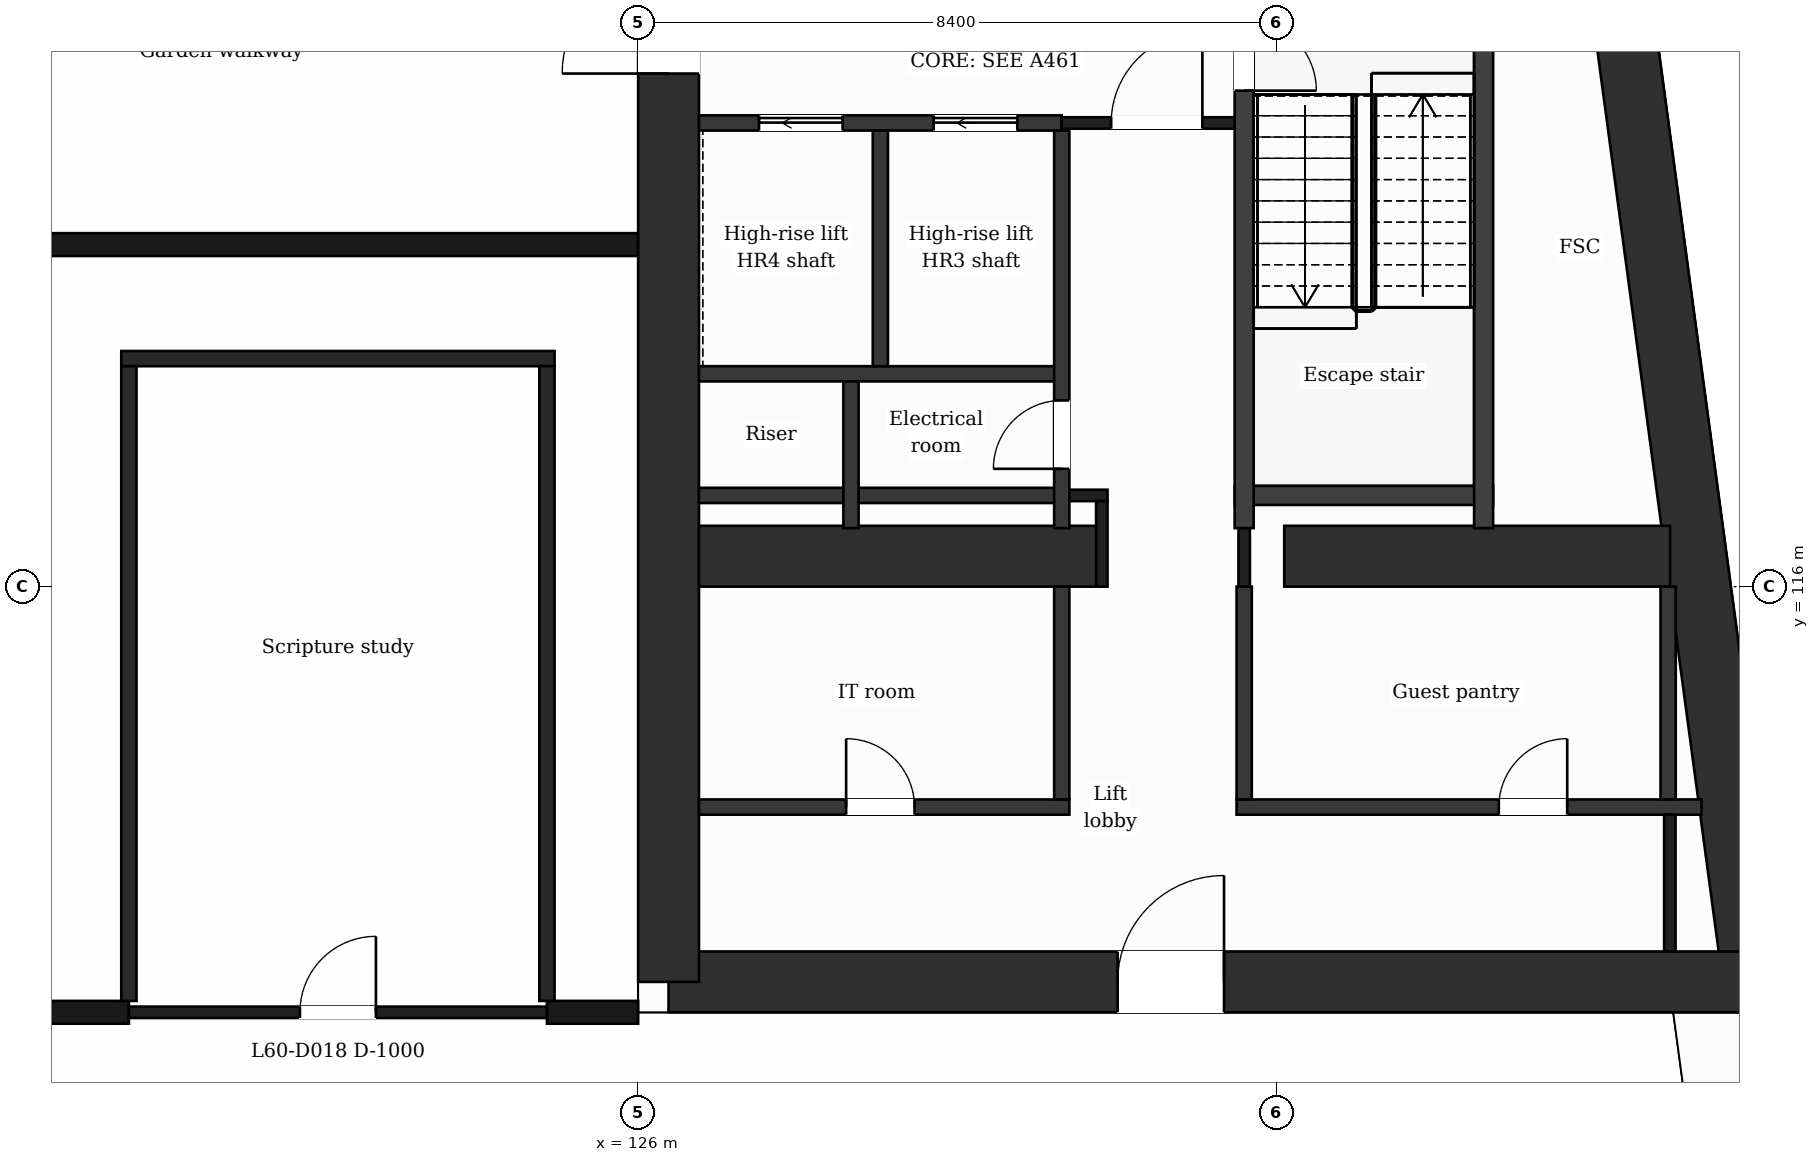
"""IFC4 building model, lengths in metres.
Left out: names, types, materials, properties, quantities, classifications, styles, units other than length and angle.
Written with IfcOpenShell. Run it as: python <this file> out.ifc"""

import sys

from ifc_helpers import new_model, si_unit, direction, frame, frame_2d, origin, place, context, subcontext, project, spatial, rectangle, extrude, element, fill, save


model = new_model("IFC4")
c1 = context("Model", 3, precision=1e-05, world=origin(), true_north=direction((0.0, 1.0)))
c2 = subcontext(c1, "Body", "Model", "MODEL_VIEW")
j1 = project(units=[si_unit("LENGTHUNIT", "METRE"), si_unit("PLANEANGLEUNIT", "RADIAN")], contexts=[c1])
p1 = place(None, origin())
s1 = spatial("IfcSite", under=j1, at=p1, CompositionType="ELEMENT")
p2 = place(p1, origin())
s2 = spatial("IfcBuilding", under=s1, at=p2, CompositionType="ELEMENT")
p3 = place(p2, frame((0.0, 0.0, 246.6)))
s3 = spatial("IfcBuildingStorey", under=s2, at=p3, CompositionType="ELEMENT", Elevation=246.6)
p4 = place(p3, frame((137.82, 132.0, 0.0), z_axis=(0.0, 0.0, 1.0), x_axis=(0.133408347329, -0.991061154956, 0.0)))
e1 = element("IfcWall", 1, at=p4, inside=s3, PredefinedType="SHEAR", context=c2, shape_type="SweptSolid", body=[
    extrude(rectangle(XDim=21.391, YDim=0.8, at=frame_2d((10.696, 0.0))), origin(), (0.0, 0.0, 1.0), 7.4),
])
p5 = place(p3, frame((140.673, 110.8, 0.0), z_axis=(0.0, 0.0, 1.0), x_axis=(-1.0, 0.0, 0.0)))
e2 = element("IfcWall", 2, at=p5, inside=s3, PredefinedType="SHEAR", context=c2, shape_type="SweptSolid", body=[
    extrude(rectangle(XDim=14.273, YDim=0.8, at=frame_2d((7.137, 0.0))), origin(), (0.0, 0.0, 1.0), 7.4),
])
p6 = place(p5, frame((6.965, 0.0, 0.0)))
e3 = element("IfcOpeningElement", 3, at=p6, cuts=e2, PredefinedType="OPENING", context=c2, shape_type="SweptSolid", body=[
    extrude(rectangle(XDim=1.4, YDim=2.1, at=frame_2d((0.7, 1.05))), frame((0.0, 0.41, 0.0), z_axis=(0.0, -1.0, 0.0), x_axis=(1.0, 0.0, 0.0)), (0.0, 0.0, 1.0), 0.82),
])
p7 = place(p3, frame((126.4, 110.8, 0.0), z_axis=(0.0, 0.0, 1.0), x_axis=(0.0, 1.0, 0.0)))
e4 = element("IfcWall", 4, at=p7, inside=s3, PredefinedType="SHEAR", context=c2, shape_type="SweptSolid", body=[
    extrude(rectangle(XDim=21.2, YDim=0.8, at=frame_2d((10.6, 0.0))), origin(), (0.0, 0.0, 1.0), 7.4),
])
p8 = place(p7, frame((11.95, 0.0, 0.0)))
e5 = element("IfcOpeningElement", 5, at=p8, cuts=e4, PredefinedType="OPENING", context=c2, shape_type="SweptSolid", body=[
    extrude(rectangle(XDim=1.4, YDim=2.1, at=frame_2d((0.7, 1.05))), frame((0.0, 0.41, 0.0), z_axis=(0.0, -1.0, 0.0), x_axis=(1.0, 0.0, 0.0)), (0.0, 0.0, 1.0), 0.82),
])
p9 = place(p3, frame((126.8, 116.4, 0.0), z_axis=(0.0, 0.0, 1.0), x_axis=(1.0, 0.0, 0.0)))
e6 = element("IfcWall", 6, at=p9, inside=s3, PredefinedType="SHEAR", context=c2, shape_type="SweptSolid", body=[
    extrude(rectangle(XDim=5.3, YDim=0.8, at=frame_2d((2.65, 0.0))), origin(), (0.0, 0.0, 1.0), 7.4),
])
p10 = place(p3, frame((134.5, 116.4, 0.0), z_axis=(0.0, 0.0, 1.0), x_axis=(1.0, 0.0, 0.0)))
e7 = element("IfcWall", 7, at=p10, inside=s3, PredefinedType="SHEAR", context=c2, shape_type="SweptSolid", body=[
    extrude(rectangle(XDim=5.077, YDim=0.8, at=frame_2d((2.539, 0.0))), origin(), (0.0, 0.0, 1.0), 7.4),
])
p11 = place(p3, frame((115.9, 110.4, 0.0), z_axis=(0.0, 0.0, 1.0), x_axis=(1.0, 0.0, 0.0)))
e8 = element("IfcWall", 8, at=p11, inside=s3, PredefinedType="PARTITIONING", context=c2, shape_type="SweptSolid", body=[
    extrude(rectangle(XDim=3.4, YDim=0.3, at=frame_2d((1.7, 0.0))), origin(), (0.0, 0.0, 1.0), 1.0),
])
p12 = place(p3, frame((124.8, 110.4, 0.0), z_axis=(0.0, 0.0, 1.0), x_axis=(1.0, 0.0, 0.0)))
e9 = element("IfcWall", 9, at=p12, inside=s3, PredefinedType="PARTITIONING", context=c2, shape_type="SweptSolid", body=[
    extrude(rectangle(XDim=1.2, YDim=0.3, at=frame_2d((0.6, 0.0))), origin(), (0.0, 0.0, 1.0), 1.0),
])
p13 = place(p3, frame((119.3, 110.4, 0.0), z_axis=(0.0, 0.0, 1.0), x_axis=(1.0, 0.0, 0.0)))
e10 = element("IfcWall", 10, at=p13, inside=s3, PredefinedType="PARTITIONING", context=c2, shape_type="SweptSolid", body=[
    extrude(rectangle(XDim=5.5, YDim=0.15, at=frame_2d((2.75, 0.0))), origin(), (0.0, 0.0, 1.0), 6.9),
])
p14 = place(p13, frame((2.25, 0.0, 0.0)))
e11 = element("IfcOpeningElement", 11, at=p14, cuts=e10, PredefinedType="OPENING", context=c2, shape_type="SweptSolid", body=[
    extrude(rectangle(XDim=1.0, YDim=2.1, at=frame_2d((0.5, 1.05))), frame((0.0, 0.085, 0.0), z_axis=(0.0, -1.0, 0.0), x_axis=(1.0, 0.0, 0.0)), (0.0, 0.0, 1.0), 0.17),
])
p15 = place(p3, frame((126.8, 113.1, 0.0), z_axis=(0.0, 0.0, 1.0), x_axis=(1.0, 0.0, 0.0)))
e12 = element("IfcWall", 12, at=p15, inside=s3, PredefinedType="PARTITIONING", context=c2, shape_type="SweptSolid", body=[
    extrude(rectangle(XDim=4.873, YDim=0.2, at=frame_2d((2.437, 0.0))), origin(), (0.0, 0.0, 1.0), 6.9),
])
p16 = place(p15, frame((1.936, 0.0, 0.0)))
e13 = element("IfcOpeningElement", 13, at=p16, cuts=e12, PredefinedType="OPENING", context=c2, shape_type="SweptSolid", body=[
    extrude(rectangle(XDim=0.9, YDim=2.1, at=frame_2d((0.45, 1.05))), frame((0.0, 0.11, 0.0), z_axis=(0.0, -1.0, 0.0), x_axis=(1.0, 0.0, 0.0)), (0.0, 0.0, 1.0), 0.22),
])
p17 = place(p3, frame((133.873, 113.1, 0.0), z_axis=(0.0, 0.0, 1.0), x_axis=(1.0, 0.0, 0.0)))
e14 = element("IfcWall", 14, at=p17, inside=s3, PredefinedType="PARTITIONING", context=c2, shape_type="SweptSolid", body=[
    extrude(rectangle(XDim=6.117, YDim=0.2, at=frame_2d((3.059, 0.0))), origin(), (0.0, 0.0, 1.0), 6.9),
])
p18 = place(p17, frame((3.45, 0.0, 0.0)))
e15 = element("IfcOpeningElement", 15, at=p18, cuts=e14, PredefinedType="OPENING", context=c2, shape_type="SweptSolid", body=[
    extrude(rectangle(XDim=0.9, YDim=2.1, at=frame_2d((0.45, 1.05))), frame((0.0, 0.11, 0.0), z_axis=(0.0, -1.0, 0.0), x_axis=(1.0, 0.0, 0.0)), (0.0, 0.0, 1.0), 0.22),
])
p19 = place(p3, frame((126.8, 117.2, 0.0), z_axis=(0.0, 0.0, 1.0), x_axis=(1.0, 0.0, 0.0)))
e16 = element("IfcWall", 16, at=p19, inside=s3, PredefinedType="PARTITIONING", context=c2, shape_type="SweptSolid", body=[
    extrude(rectangle(XDim=4.773, YDim=0.2, at=frame_2d((2.386, 0.0))), origin(), (0.0, 0.0, 1.0), 6.9),
])
p20 = place(p3, frame((131.573, 117.2, 0.0), z_axis=(0.0, 0.0, 1.0), x_axis=(1.0, 0.0, 0.0)))
e17 = element("IfcWall", 17, at=p20, inside=s3, PredefinedType="PARTITIONING", context=c2, shape_type="SweptSolid", body=[
    extrude(rectangle(XDim=0.602, YDim=0.15, at=frame_2d((0.301, 0.0))), origin(), (0.0, 0.0, 1.0), 6.9),
])
p21 = place(p3, frame((133.848, 117.2, 0.0), z_axis=(0.0, 0.0, 1.0), x_axis=(1.0, 0.0, 0.0)))
e18 = element("IfcWall", 18, at=p21, inside=s3, PredefinedType="PARTITIONING", context=c2, shape_type="SweptSolid", body=[
    extrude(rectangle(XDim=3.4, YDim=0.25, at=frame_2d((1.7, 0.0))), origin(), (0.0, 0.0, 1.0), 6.9),
])
p22 = place(p3, frame((126.8, 118.8, 0.0), z_axis=(0.0, 0.0, 1.0), x_axis=(1.0, 0.0, 0.0)))
e19 = element("IfcWall", 19, at=p22, inside=s3, PredefinedType="PARTITIONING", context=c2, shape_type="SweptSolid", body=[
    extrude(rectangle(XDim=4.773, YDim=0.2, at=frame_2d((2.386, 0.0))), origin(), (0.0, 0.0, 1.0), 6.9),
])
p23 = place(p3, frame((119.2, 119.0, 0.0), z_axis=(0.0, 0.0, 1.0), x_axis=(1.0, 0.0, 0.0)))
e20 = element("IfcWall", 20, at=p23, inside=s3, PredefinedType="PARTITIONING", context=c2, shape_type="SweptSolid", body=[
    extrude(rectangle(XDim=5.7, YDim=0.2, at=frame_2d((2.85, 0.0))), origin(), (0.0, 0.0, 1.0), 6.9),
])
p24 = place(p3, frame((100.8, 120.5, 0.0), z_axis=(0.0, 0.0, 1.0), x_axis=(1.0, 0.0, 0.0)))
e21 = element("IfcWall", 21, at=p24, inside=s3, PredefinedType="PARTITIONING", context=c2, shape_type="SweptSolid", body=[
    extrude(rectangle(XDim=25.2, YDim=0.3, at=frame_2d((12.6, 0.0))), origin(), (0.0, 0.0, 1.0), 1.0),
])
p25 = place(p3, frame((126.8, 122.1, 0.0), z_axis=(0.0, 0.0, 1.0), x_axis=(1.0, 0.0, 0.0)))
e22 = element("IfcWall", 22, at=p25, inside=s3, PredefinedType="PARTITIONING", context=c2, shape_type="SweptSolid", body=[
    extrude(rectangle(XDim=4.773, YDim=0.2, at=frame_2d((2.386, 0.0))), origin(), (0.0, 0.0, 1.0), 6.9),
])
p26 = place(p25, frame((3.088, 0.0, 0.0)))
e23 = element("IfcOpeningElement", 23, at=p26, cuts=e22, PredefinedType="OPENING", context=c2, shape_type="SweptSolid", body=[
    extrude(rectangle(XDim=1.1, YDim=2.1, at=frame_2d((0.55, 1.05))), frame((0.0, 0.11, 0.0), z_axis=(0.0, -1.0, 0.0), x_axis=(1.0, 0.0, 0.0)), (0.0, 0.0, 1.0), 0.22),
])
p27 = place(p25, frame((0.79, 0.0, 0.0)))
e24 = element("IfcOpeningElement", 24, at=p27, cuts=e22, PredefinedType="OPENING", context=c2, shape_type="SweptSolid", body=[
    extrude(rectangle(XDim=1.1, YDim=2.1, at=frame_2d((0.55, 1.05))), frame((0.0, 0.11, 0.0), z_axis=(0.0, -1.0, 0.0), x_axis=(1.0, 0.0, 0.0)), (0.0, 0.0, 1.0), 0.22),
])
p28 = place(p3, frame((131.573, 122.1, 0.0), z_axis=(0.0, 0.0, 1.0), x_axis=(1.0, 0.0, 0.0)))
e25 = element("IfcWall", 25, at=p28, inside=s3, PredefinedType="PARTITIONING", context=c2, shape_type="SweptSolid", body=[
    extrude(rectangle(XDim=2.4, YDim=0.15, at=frame_2d((1.2, 0.0))), origin(), (0.0, 0.0, 1.0), 6.9),
])
p29 = place(p28, frame((0.65, 0.0, 0.0)))
e26 = element("IfcOpeningElement", 26, at=p29, cuts=e25, PredefinedType="OPENING", context=c2, shape_type="SweptSolid", body=[
    extrude(rectangle(XDim=1.2, YDim=2.1, at=frame_2d((0.6, 1.05))), frame((0.0, 0.085, 0.0), z_axis=(0.0, -1.0, 0.0), x_axis=(1.0, 0.0, 0.0)), (0.0, 0.0, 1.0), 0.17),
])
for number, where, z_axis, x_axis in (
    (27, (119.3, 110.55, 0.0), (0.0, 0.0, 1.0), (0.0, 1.0, 0.0)),
    (28, (124.8, 110.55, 0.0), (0.0, 0.0, 1.0), (0.0, 1.0, 0.0)),
):
    element("IfcWall", number, at=place(p3, frame(where, z_axis=z_axis, x_axis=x_axis)), inside=s3, PredefinedType="PARTITIONING", context=c2, shape_type="SweptSolid", body=[
        extrude(rectangle(XDim=8.35, YDim=0.2, at=frame_2d((4.175, 0.0))), origin(), (0.0, 0.0, 1.0), 6.9),
    ])
p30 = place(p3, frame((128.8, 116.77, 0.0), z_axis=(0.0, 0.0, 1.0), x_axis=(0.0, 1.0, 0.0)))
e29 = element("IfcWall", 29, at=p30, inside=s3, PredefinedType="PARTITIONING", context=c2, shape_type="SweptSolid", body=[
    extrude(rectangle(XDim=1.93, YDim=0.2, at=frame_2d((0.965, 0.0))), origin(), (0.0, 0.0, 1.0), 6.9),
])
p31 = place(p3, frame((129.187, 118.9, 0.0), z_axis=(0.0, 0.0, 1.0), x_axis=(0.0, 1.0, 0.0)))
e30 = element("IfcWall", 30, at=p31, inside=s3, PredefinedType="PARTITIONING", context=c2, shape_type="SweptSolid", body=[
    extrude(rectangle(XDim=3.1, YDim=0.2, at=frame_2d((1.55, 0.0))), origin(), (0.0, 0.0, 1.0), 6.9),
])
p32 = place(p3, frame((131.573, 113.2, 0.0), z_axis=(0.0, 0.0, 1.0), x_axis=(0.0, 1.0, 0.0)))
e31 = element("IfcWall", 31, at=p32, inside=s3, PredefinedType="PARTITIONING", context=c2, shape_type="SweptSolid", body=[
    extrude(rectangle(XDim=2.8, YDim=0.2, at=frame_2d((1.4, 0.0))), origin(), (0.0, 0.0, 1.0), 6.9),
])
p33 = place(p3, frame((131.573, 116.77, 0.0), z_axis=(0.0, 0.0, 1.0), x_axis=(0.0, 1.0, 0.0)))
e32 = element("IfcWall", 32, at=p33, inside=s3, PredefinedType="PARTITIONING", context=c2, shape_type="SweptSolid", body=[
    extrude(rectangle(XDim=5.23, YDim=0.2, at=frame_2d((2.615, 0.0))), origin(), (0.0, 0.0, 1.0), 6.9),
])
p34 = place(p33, frame((0.78, 0.0, 0.0)))
e33 = element("IfcOpeningElement", 33, at=p34, cuts=e32, PredefinedType="OPENING", context=c2, shape_type="SweptSolid", body=[
    extrude(rectangle(XDim=0.9, YDim=2.1, at=frame_2d((0.45, 1.05))), frame((0.0, 0.11, 0.0), z_axis=(0.0, -1.0, 0.0), x_axis=(1.0, 0.0, 0.0)), (0.0, 0.0, 1.0), 0.22),
])
p35 = place(p3, frame((132.1, 116.0, 0.0), z_axis=(0.0, 0.0, 1.0), x_axis=(0.0, 1.0, 0.0)))
e34 = element("IfcWall", 34, at=p35, inside=s3, PredefinedType="PARTITIONING", context=c2, shape_type="SweptSolid", body=[
    extrude(rectangle(XDim=1.125, YDim=0.15, at=frame_2d((0.562, 0.0))), origin(), (0.0, 0.0, 1.0), 6.9),
])
p36 = place(p3, frame((133.973, 113.2, 0.0), z_axis=(0.0, 0.0, 1.0), x_axis=(0.0, 1.0, 0.0)))
e35 = element("IfcWall", 35, at=p36, inside=s3, PredefinedType="PARTITIONING", context=c2, shape_type="SweptSolid", body=[
    extrude(rectangle(XDim=2.8, YDim=0.2, at=frame_2d((1.4, 0.0))), origin(), (0.0, 0.0, 1.0), 6.9),
])
p37 = place(p3, frame((133.973, 116.0, 0.0), z_axis=(0.0, 0.0, 1.0), x_axis=(0.0, 1.0, 0.0)))
e36 = element("IfcWall", 36, at=p37, inside=s3, PredefinedType="PARTITIONING", context=c2, shape_type="SweptSolid", body=[
    extrude(rectangle(XDim=0.77, YDim=0.15, at=frame_2d((0.385, 0.0))), origin(), (0.0, 0.0, 1.0), 6.9),
])
p38 = place(p3, frame((133.973, 116.77, 0.0), z_axis=(0.0, 0.0, 1.0), x_axis=(0.0, 1.0, 0.0)))
e37 = element("IfcWall", 37, at=p38, inside=s3, PredefinedType="PARTITIONING", context=c2, shape_type="SweptSolid", body=[
    extrude(rectangle(XDim=7.055, YDim=0.25, at=frame_2d((3.527, 0.0))), origin(), (0.0, 0.0, 1.0), 6.9),
])
p39 = place(p38, frame((5.755, 0.0, 0.0)))
e38 = element("IfcOpeningElement", 38, at=p39, cuts=e37, PredefinedType="OPENING", context=c2, shape_type="SweptSolid", body=[
    extrude(rectangle(XDim=0.95, YDim=2.1, at=frame_2d((0.475, 1.05))), frame((0.0, 0.135, 0.0), z_axis=(0.0, -1.0, 0.0), x_axis=(1.0, 0.0, 0.0)), (0.0, 0.0, 1.0), 0.27),
])
p40 = place(p3, frame((137.123, 116.77, 0.0), z_axis=(0.0, 0.0, 1.0), x_axis=(0.0, 1.0, 0.0)))
e39 = element("IfcWall", 39, at=p40, inside=s3, PredefinedType="PARTITIONING", context=c2, shape_type="SweptSolid", body=[
    extrude(rectangle(XDim=7.055, YDim=0.25, at=frame_2d((3.527, 0.0))), origin(), (0.0, 0.0, 1.0), 6.9),
])
p41 = place(p3, frame((139.551, 113.2, 0.0), z_axis=(0.0, 0.0, 1.0), x_axis=(0.0, 1.0, 0.0)))
e40 = element("IfcWall", 40, at=p41, inside=s3, PredefinedType="PARTITIONING", context=c2, shape_type="SweptSolid", body=[
    extrude(rectangle(XDim=2.8, YDim=0.2, at=frame_2d((1.4, 0.0))), origin(), (0.0, 0.0, 1.0), 6.9),
])
p42 = place(p3, frame((139.573, 111.2, 0.0), z_axis=(0.0, 0.0, 1.0), x_axis=(0.0, 1.0, 0.0)))
e41 = element("IfcWall", 41, at=p42, inside=s3, PredefinedType="PARTITIONING", context=c2, shape_type="SweptSolid", body=[
    extrude(rectangle(XDim=1.8, YDim=0.15, at=frame_2d((0.9, 0.0))), origin(), (0.0, 0.0, 1.0), 6.9),
])
p43 = place(p14, origin())
e42 = element("IfcDoor", 42, at=p43, inside=s3, OperationType="SINGLE_SWING_RIGHT", PredefinedType="DOOR", context=c2, shape_type="SweptSolid", body=[
    extrude(rectangle(XDim=1.0, YDim=2.1, at=frame_2d((0.5, 1.05))), frame((0.0, 0.025, 0.0), z_axis=(0.0, -1.0, 0.0), x_axis=(1.0, 0.0, 0.0)), (0.0, 0.0, 1.0), 0.05),
])
fill(e11, e42)
p44 = place(p29, origin())
e43 = element("IfcDoor", 43, at=p44, inside=s3, OperationType="SINGLE_SWING_RIGHT", PredefinedType="DOOR", context=c2, shape_type="SweptSolid", body=[
    extrude(rectangle(XDim=1.2, YDim=2.1, at=frame_2d((0.6, 1.05))), frame((0.0, 0.025, 0.0), z_axis=(0.0, -1.0, 0.0), x_axis=(1.0, 0.0, 0.0)), (0.0, 0.0, 1.0), 0.05),
])
fill(e26, e43)
p45 = place(p26, origin())
e44 = element("IfcDoor", 44, at=p45, inside=s3, OperationType="SLIDING_TO_LEFT", PredefinedType="DOOR", context=c2, shape_type="SweptSolid", body=[
    extrude(rectangle(XDim=1.1, YDim=2.1, at=frame_2d((0.55, 1.05))), frame((0.0, 0.025, 0.0), z_axis=(0.0, -1.0, 0.0), x_axis=(1.0, 0.0, 0.0)), (0.0, 0.0, 1.0), 0.05),
])
fill(e23, e44)
p46 = place(p27, origin())
e45 = element("IfcDoor", 45, at=p46, inside=s3, OperationType="SLIDING_TO_LEFT", PredefinedType="DOOR", context=c2, shape_type="SweptSolid", body=[
    extrude(rectangle(XDim=1.1, YDim=2.1, at=frame_2d((0.55, 1.05))), frame((0.0, 0.025, 0.0), z_axis=(0.0, -1.0, 0.0), x_axis=(1.0, 0.0, 0.0)), (0.0, 0.0, 1.0), 0.05),
])
fill(e24, e45)
p47 = place(p39, origin())
e46 = element("IfcDoor", 46, at=p47, inside=s3, OperationType="SINGLE_SWING_LEFT", PredefinedType="DOOR", context=c2, shape_type="SweptSolid", body=[
    extrude(rectangle(XDim=0.95, YDim=2.1, at=frame_2d((0.475, 1.05))), frame((0.0, 0.025, 0.0), z_axis=(0.0, -1.0, 0.0), x_axis=(1.0, 0.0, 0.0)), (0.0, 0.0, 1.0), 0.05),
])
fill(e38, e46)
p48 = place(p34, origin())
e47 = element("IfcDoor", 47, at=p48, inside=s3, OperationType="SINGLE_SWING_LEFT", PredefinedType="DOOR", context=c2, shape_type="SweptSolid", body=[
    extrude(rectangle(XDim=0.9, YDim=2.1, at=frame_2d((0.45, 1.05))), frame((0.0, 0.025, 0.0), z_axis=(0.0, -1.0, 0.0), x_axis=(1.0, 0.0, 0.0)), (0.0, 0.0, 1.0), 0.05),
])
fill(e33, e47)
p49 = place(p18, origin())
e48 = element("IfcDoor", 48, at=p49, inside=s3, OperationType="SINGLE_SWING_RIGHT", PredefinedType="DOOR", context=c2, shape_type="SweptSolid", body=[
    extrude(rectangle(XDim=0.9, YDim=2.1, at=frame_2d((0.45, 1.05))), frame((0.0, 0.025, 0.0), z_axis=(0.0, -1.0, 0.0), x_axis=(1.0, 0.0, 0.0)), (0.0, 0.0, 1.0), 0.05),
])
fill(e15, e48)
p50 = place(p16, origin())
e49 = element("IfcDoor", 49, at=p50, inside=s3, OperationType="SINGLE_SWING_LEFT", PredefinedType="DOOR", context=c2, shape_type="SweptSolid", body=[
    extrude(rectangle(XDim=0.9, YDim=2.1, at=frame_2d((0.45, 1.05))), frame((0.0, 0.025, 0.0), z_axis=(0.0, -1.0, 0.0), x_axis=(1.0, 0.0, 0.0)), (0.0, 0.0, 1.0), 0.05),
])
fill(e13, e49)
p51 = place(p6, origin())
e50 = element("IfcDoor", 50, at=p51, inside=s3, OperationType="SINGLE_SWING_LEFT", PredefinedType="DOOR", context=c2, shape_type="SweptSolid", body=[
    extrude(rectangle(XDim=1.4, YDim=2.1, at=frame_2d((0.7, 1.05))), frame((0.0, 0.025, 0.0), z_axis=(0.0, -1.0, 0.0), x_axis=(1.0, 0.0, 0.0)), (0.0, 0.0, 1.0), 0.05),
])
fill(e3, e50)
p52 = place(p8, origin())
e51 = element("IfcDoor", 51, at=p52, inside=s3, OperationType="SINGLE_SWING_LEFT", PredefinedType="DOOR", context=c2, shape_type="SweptSolid", body=[
    extrude(rectangle(XDim=1.4, YDim=2.1, at=frame_2d((0.7, 1.05))), frame((0.0, 0.025, 0.0), z_axis=(0.0, -1.0, 0.0), x_axis=(1.0, 0.0, 0.0)), (0.0, 0.0, 1.0), 0.05),
])
fill(e5, e51)
save(model, sys.argv[1])
